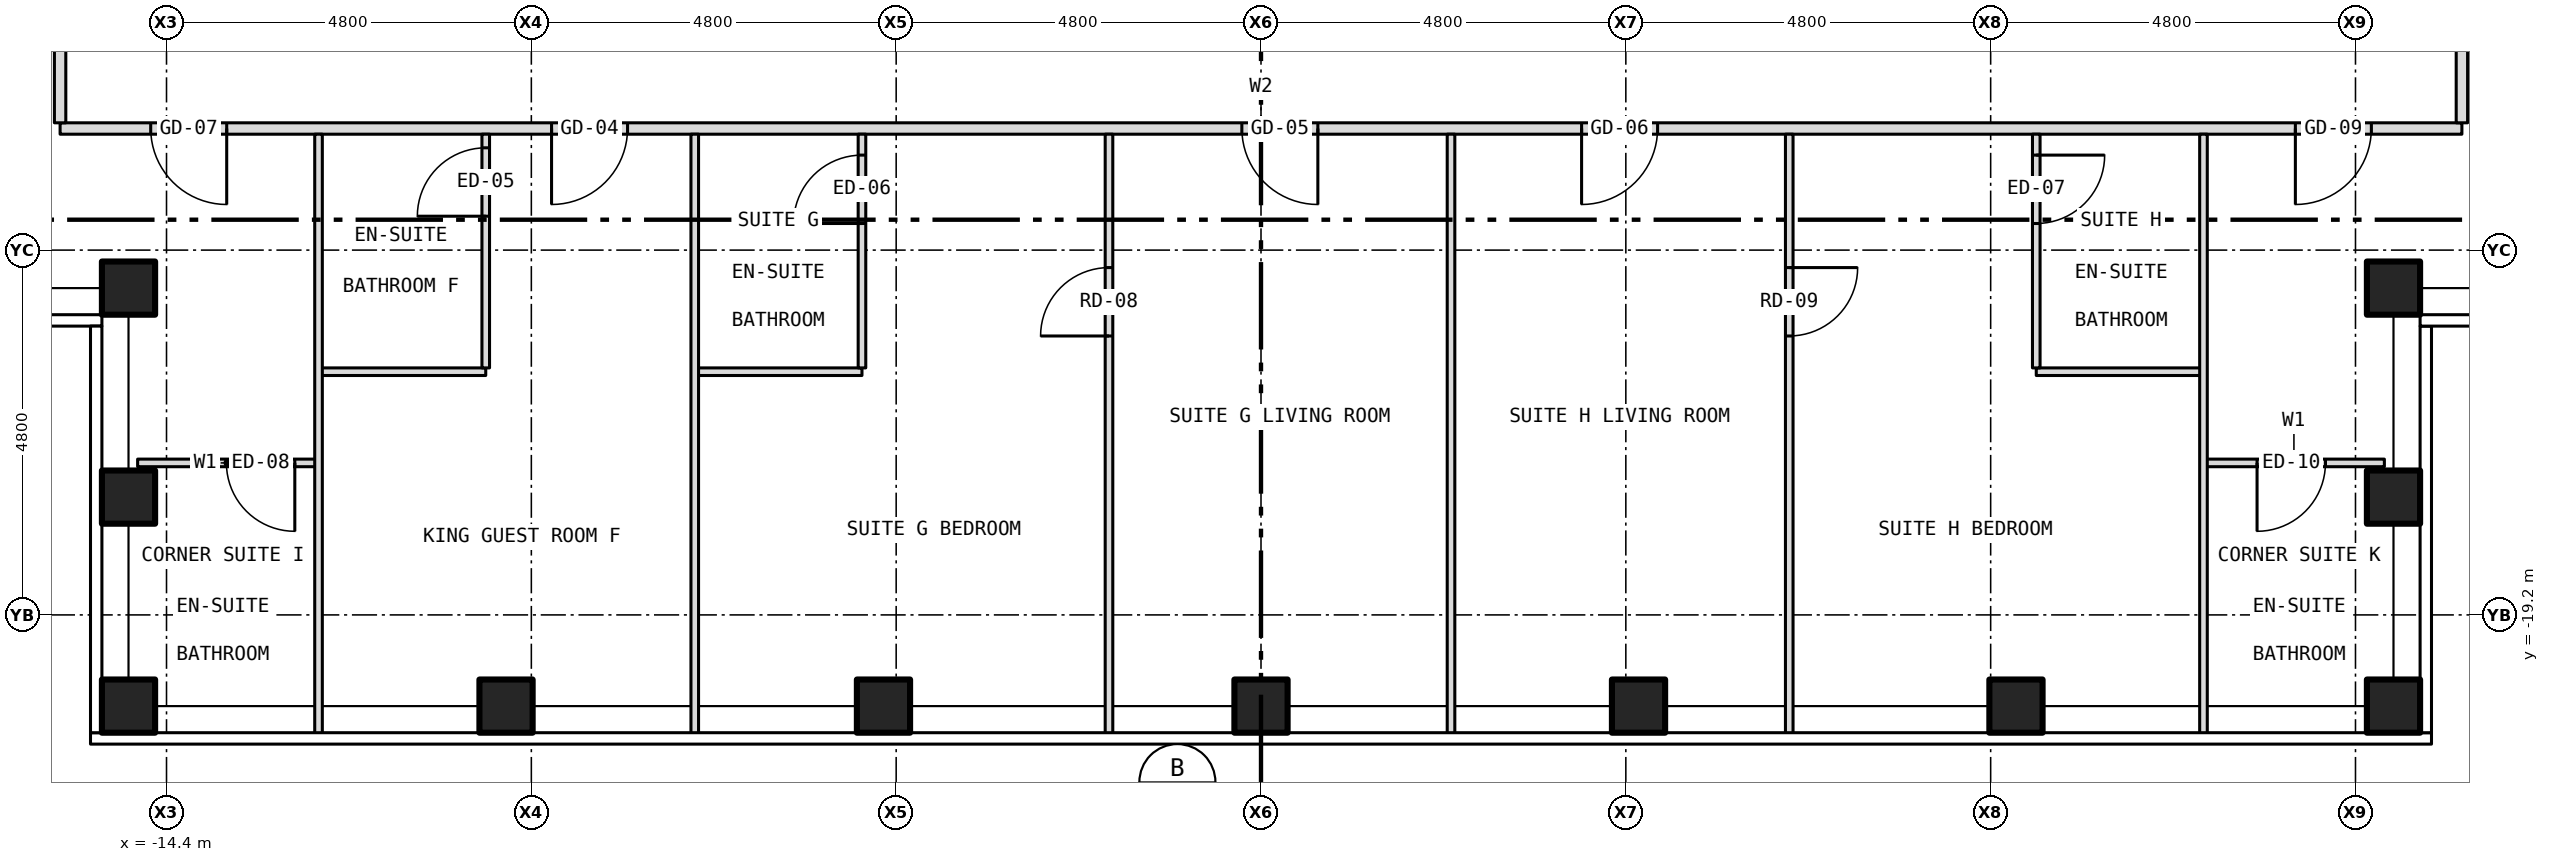
"""IFC4 building model, lengths in metres.
Left out: names, types, materials, properties, quantities, classifications, styles, units other than length and angle.
Written with IfcOpenShell. Run it as: python <this file> out.ifc"""

import sys

from ifc_helpers import new_model, si_unit, direction, frame, frame_2d, origin, origin_2d, place, context, subcontext, project, spatial, rectangle, hollow_rectangle, extrude, element, fill, save


model = new_model("IFC4")
c1 = context("Model", 3, precision=1e-05, world=origin(), true_north=direction((0.0, 1.0)))
c2 = subcontext(c1, "Body", "Model", "MODEL_VIEW")
j1 = project(units=[si_unit("LENGTHUNIT", "METRE"), si_unit("PLANEANGLEUNIT", "RADIAN")], contexts=[c1])
p1 = place(None, origin())
s1 = spatial("IfcSite", under=j1, at=p1, CompositionType="ELEMENT")
p2 = place(p1, origin())
s2 = spatial("IfcBuilding", under=s1, at=p2, CompositionType="ELEMENT")
p3 = place(p2, frame((0.0, 0.0, 208.5)))
s3 = spatial("IfcBuildingStorey", under=s2, at=p3, CompositionType="ELEMENT", Elevation=208.5)
for number, where, z_axis, x_axis in (
    (1, (-14.9, -20.4, -0.15), (0.0, 0.0, 1.0), (1.0, 0.0, 0.0)),
    (2, (-9.933, -20.4, -0.15), (0.0, 0.0, 1.0), (1.0, 0.0, 0.0)),
    (3, (-4.967, -20.4, -0.15), (0.0, 0.0, 1.0), (1.0, 0.0, 0.0)),
    (4, (0.0, -20.4, -0.15), (0.0, 0.0, 1.0), (1.0, 0.0, 0.0)),
    (5, (4.967, -20.4, -0.15), (0.0, 0.0, 1.0), (1.0, 0.0, 0.0)),
    (6, (9.933, -20.4, -0.15), (0.0, 0.0, 1.0), (1.0, 0.0, 0.0)),
    (7, (14.9, -20.4, -0.15), (0.0, 0.0, 1.0), (1.0, 0.0, 0.0)),
    (8, (-14.9, -14.9, -0.15), (0.0, 0.0, 1.0), (1.0, 0.0, 0.0)),
    (9, (-14.9, -17.65, -0.15), (0.0, 0.0, 1.0), (1.0, 0.0, 0.0)),
    (10, (14.9, -14.9, -0.15), (0.0, 0.0, 1.0), (1.0, 0.0, 0.0)),
    (11, (14.9, -17.65, -0.15), (0.0, 0.0, 1.0), (1.0, 0.0, 0.0)),
):
    element("IfcColumn", number, at=place(p3, frame(where, z_axis=z_axis, x_axis=x_axis)), inside=s3, PredefinedType="COLUMN", context=c2, shape_type="SweptSolid", body=[
        extrude(hollow_rectangle(XDim=0.7, YDim=0.7, WallThickness=0.04, at=origin_2d()), origin(), (0.0, 0.0, 1.0), 3.5),
    ])
p4 = place(p3, frame((-14.78, -17.2, 0.0), z_axis=(0.0, 0.0, 1.0), x_axis=(1.0, 0.0, 0.0)))
e12 = element("IfcWall", 12, at=p4, inside=s3, PredefinedType="PARTITIONING", context=c2, shape_type="SweptSolid", body=[
    extrude(rectangle(XDim=2.38, YDim=0.1, at=frame_2d((1.19, 0.0))), origin(), (0.0, 0.0, 1.0), 3.35),
])
p5 = place(p4, frame((1.168, 0.0, 0.0)))
e13 = element("IfcOpeningElement", 13, at=p5, cuts=e12, PredefinedType="OPENING", context=c2, shape_type="SweptSolid", body=[
    extrude(rectangle(XDim=0.9, YDim=2.1, at=frame_2d((0.45, 1.05))), frame((0.0, 0.062, 0.0), z_axis=(0.0, -1.0, 0.0), x_axis=(1.0, 0.0, 0.0)), (0.0, 0.0, 1.0), 0.124),
])
p6 = place(p3, frame((12.4, -17.2, 0.0), z_axis=(0.0, 0.0, 1.0), x_axis=(1.0, 0.0, 0.0)))
e14 = element("IfcWall", 14, at=p6, inside=s3, PredefinedType="PARTITIONING", context=c2, shape_type="SweptSolid", body=[
    extrude(rectangle(XDim=2.38, YDim=0.1, at=frame_2d((1.19, 0.0))), origin(), (0.0, 0.0, 1.0), 3.35),
])
p7 = place(p6, frame((0.705, 0.0, 0.0)))
e15 = element("IfcOpeningElement", 15, at=p7, cuts=e14, PredefinedType="OPENING", context=c2, shape_type="SweptSolid", body=[
    extrude(rectangle(XDim=0.9, YDim=2.1, at=frame_2d((0.45, 1.05))), frame((0.0, 0.062, 0.0), z_axis=(0.0, -1.0, 0.0), x_axis=(1.0, 0.0, 0.0)), (0.0, 0.0, 1.0), 0.124),
])
for number, where, z_axis, x_axis in (
    (16, (-12.4, -16.0, 0.0), (0.0, 0.0, 1.0), (1.0, 0.0, 0.0)),
    (17, (-7.45, -16.0, 0.0), (0.0, 0.0, 1.0), (1.0, 0.0, 0.0)),
    (18, (10.2, -16.0, 0.0), (0.0, 0.0, 1.0), (1.0, 0.0, 0.0)),
):
    element("IfcWall", number, at=place(p3, frame(where, z_axis=z_axis, x_axis=x_axis)), inside=s3, PredefinedType="PARTITIONING", context=c2, shape_type="SweptSolid", body=[
        extrude(rectangle(XDim=2.2, YDim=0.1, at=frame_2d((1.1, 0.0))), origin(), (0.0, 0.0, 1.0), 3.35),
    ])
p8 = place(p3, frame((-15.8, -12.8, 0.0), z_axis=(0.0, 0.0, 1.0), x_axis=(1.0, 0.0, 0.0)))
e19 = element("IfcWall", 19, at=p8, inside=s3, PredefinedType="PARTITIONING", context=c2, shape_type="SweptSolid", body=[
    extrude(rectangle(XDim=31.6, YDim=0.15, at=frame_2d((15.8, 0.0))), origin(), (0.0, 0.0, 1.0), 3.35),
])
p9 = place(p8, frame((6.466, 0.0, 0.0)))
e20 = element("IfcOpeningElement", 20, at=p9, cuts=e19, PredefinedType="OPENING", context=c2, shape_type="SweptSolid", body=[
    extrude(rectangle(XDim=1.0, YDim=2.1, at=frame_2d((0.5, 1.05))), frame((0.0, 0.087, 0.0), z_axis=(0.0, -1.0, 0.0), x_axis=(1.0, 0.0, 0.0)), (0.0, 0.0, 1.0), 0.174),
])
p10 = place(p8, frame((15.548, 0.0, 0.0)))
e21 = element("IfcOpeningElement", 21, at=p10, cuts=e19, PredefinedType="OPENING", context=c2, shape_type="SweptSolid", body=[
    extrude(rectangle(XDim=1.0, YDim=2.1, at=frame_2d((0.5, 1.05))), frame((0.0, 0.087, 0.0), z_axis=(0.0, -1.0, 0.0), x_axis=(1.0, 0.0, 0.0)), (0.0, 0.0, 1.0), 0.174),
])
p11 = place(p8, frame((20.018, 0.0, 0.0)))
e22 = element("IfcOpeningElement", 22, at=p11, cuts=e19, PredefinedType="OPENING", context=c2, shape_type="SweptSolid", body=[
    extrude(rectangle(XDim=1.0, YDim=2.1, at=frame_2d((0.5, 1.05))), frame((0.0, 0.087, 0.0), z_axis=(0.0, -1.0, 0.0), x_axis=(1.0, 0.0, 0.0)), (0.0, 0.0, 1.0), 0.174),
])
p12 = place(p8, frame((1.192, 0.0, 0.0)))
e23 = element("IfcOpeningElement", 23, at=p12, cuts=e19, PredefinedType="OPENING", context=c2, shape_type="SweptSolid", body=[
    extrude(rectangle(XDim=1.0, YDim=2.1, at=frame_2d((0.5, 1.05))), frame((0.0, 0.087, 0.0), z_axis=(0.0, -1.0, 0.0), x_axis=(1.0, 0.0, 0.0)), (0.0, 0.0, 1.0), 0.174),
])
p13 = place(p8, frame((29.409, 0.0, 0.0)))
e24 = element("IfcOpeningElement", 24, at=p13, cuts=e19, PredefinedType="OPENING", context=c2, shape_type="SweptSolid", body=[
    extrude(rectangle(XDim=1.0, YDim=2.1, at=frame_2d((0.5, 1.05))), frame((0.0, 0.087, 0.0), z_axis=(0.0, -1.0, 0.0), x_axis=(1.0, 0.0, 0.0)), (0.0, 0.0, 1.0), 0.174),
])
p14 = place(p3, frame((-15.8, -12.725, 0.0), z_axis=(0.0, 0.0, 1.0), x_axis=(0.0, 1.0, 0.0)))
e25 = element("IfcWall", 25, at=p14, inside=s3, PredefinedType="PARTITIONING", context=c2, shape_type="SweptSolid", body=[
    extrude(rectangle(XDim=1.805, YDim=0.15, at=frame_2d((0.903, 0.0))), origin(), (0.0, 0.0, 1.0), 3.35),
])
p15 = place(p3, frame((-12.4, -20.78, 0.0), z_axis=(0.0, 0.0, 1.0), x_axis=(0.0, 1.0, 0.0)))
e26 = element("IfcWall", 26, at=p15, inside=s3, PredefinedType="PARTITIONING", context=c2, shape_type="SweptSolid", body=[
    extrude(rectangle(XDim=7.905, YDim=0.1, at=frame_2d((3.953, 0.0))), origin(), (0.0, 0.0, 1.0), 3.35),
])
p16 = place(p3, frame((-10.2, -15.95, 0.0), z_axis=(0.0, 0.0, 1.0), x_axis=(0.0, 1.0, 0.0)))
e27 = element("IfcWall", 27, at=p16, inside=s3, PredefinedType="PARTITIONING", context=c2, shape_type="SweptSolid", body=[
    extrude(rectangle(XDim=3.075, YDim=0.1, at=frame_2d((1.538, 0.0))), origin(), (0.0, 0.0, 1.0), 3.35),
])
p17 = place(p16, frame((1.996, 0.0, 0.0)))
e28 = element("IfcOpeningElement", 28, at=p17, cuts=e27, PredefinedType="OPENING", context=c2, shape_type="SweptSolid", body=[
    extrude(rectangle(XDim=0.9, YDim=2.1, at=frame_2d((0.45, 1.05))), frame((0.0, 0.062, 0.0), z_axis=(0.0, -1.0, 0.0), x_axis=(1.0, 0.0, 0.0)), (0.0, 0.0, 1.0), 0.124),
])
p18 = place(p3, frame((-7.45, -20.78, 0.0), z_axis=(0.0, 0.0, 1.0), x_axis=(0.0, 1.0, 0.0)))
e29 = element("IfcWall", 29, at=p18, inside=s3, PredefinedType="PARTITIONING", context=c2, shape_type="SweptSolid", body=[
    extrude(rectangle(XDim=7.905, YDim=0.1, at=frame_2d((3.953, 0.0))), origin(), (0.0, 0.0, 1.0), 3.35),
])
p19 = place(p3, frame((-5.25, -15.95, 0.0), z_axis=(0.0, 0.0, 1.0), x_axis=(0.0, 1.0, 0.0)))
e30 = element("IfcWall", 30, at=p19, inside=s3, PredefinedType="PARTITIONING", context=c2, shape_type="SweptSolid", body=[
    extrude(rectangle(XDim=3.075, YDim=0.1, at=frame_2d((1.538, 0.0))), origin(), (0.0, 0.0, 1.0), 3.35),
])
p20 = place(p19, frame((1.9, 0.0, 0.0)))
e31 = element("IfcOpeningElement", 31, at=p20, cuts=e30, PredefinedType="OPENING", context=c2, shape_type="SweptSolid", body=[
    extrude(rectangle(XDim=0.9, YDim=2.1, at=frame_2d((0.45, 1.05))), frame((0.0, 0.062, 0.0), z_axis=(0.0, -1.0, 0.0), x_axis=(1.0, 0.0, 0.0)), (0.0, 0.0, 1.0), 0.124),
])
p21 = place(p3, frame((-2.0, -20.78, 0.0), z_axis=(0.0, 0.0, 1.0), x_axis=(0.0, 1.0, 0.0)))
e32 = element("IfcWall", 32, at=p21, inside=s3, PredefinedType="PARTITIONING", context=c2, shape_type="SweptSolid", body=[
    extrude(rectangle(XDim=7.905, YDim=0.1, at=frame_2d((3.953, 0.0))), origin(), (0.0, 0.0, 1.0), 3.35),
])
p22 = place(p21, frame((5.25, 0.0, 0.0)))
e33 = element("IfcOpeningElement", 33, at=p22, cuts=e32, PredefinedType="OPENING", context=c2, shape_type="SweptSolid", body=[
    extrude(rectangle(XDim=0.9, YDim=2.1, at=frame_2d((0.45, 1.05))), frame((0.0, 0.062, 0.0), z_axis=(0.0, -1.0, 0.0), x_axis=(1.0, 0.0, 0.0)), (0.0, 0.0, 1.0), 0.124),
])
p23 = place(p3, frame((2.5, -20.78, 0.0), z_axis=(0.0, 0.0, 1.0), x_axis=(0.0, 1.0, 0.0)))
e34 = element("IfcWall", 34, at=p23, inside=s3, PredefinedType="PARTITIONING", context=c2, shape_type="SweptSolid", body=[
    extrude(rectangle(XDim=7.905, YDim=0.1, at=frame_2d((3.953, 0.0))), origin(), (0.0, 0.0, 1.0), 3.35),
])
p24 = place(p3, frame((6.95, -20.78, 0.0), z_axis=(0.0, 0.0, 1.0), x_axis=(0.0, 1.0, 0.0)))
e35 = element("IfcWall", 35, at=p24, inside=s3, PredefinedType="PARTITIONING", context=c2, shape_type="SweptSolid", body=[
    extrude(rectangle(XDim=7.905, YDim=0.1, at=frame_2d((3.953, 0.0))), origin(), (0.0, 0.0, 1.0), 3.35),
])
p25 = place(p24, frame((5.25, 0.0, 0.0)))
e36 = element("IfcOpeningElement", 36, at=p25, cuts=e35, PredefinedType="OPENING", context=c2, shape_type="SweptSolid", body=[
    extrude(rectangle(XDim=0.9, YDim=2.1, at=frame_2d((0.45, 1.05))), frame((0.0, 0.062, 0.0), z_axis=(0.0, -1.0, 0.0), x_axis=(1.0, 0.0, 0.0)), (0.0, 0.0, 1.0), 0.124),
])
p26 = place(p3, frame((10.2, -15.95, 0.0), z_axis=(0.0, 0.0, 1.0), x_axis=(0.0, 1.0, 0.0)))
e37 = element("IfcWall", 37, at=p26, inside=s3, PredefinedType="PARTITIONING", context=c2, shape_type="SweptSolid", body=[
    extrude(rectangle(XDim=3.075, YDim=0.1, at=frame_2d((1.538, 0.0))), origin(), (0.0, 0.0, 1.0), 3.35),
])
p27 = place(p26, frame((1.9, 0.0, 0.0)))
e38 = element("IfcOpeningElement", 38, at=p27, cuts=e37, PredefinedType="OPENING", context=c2, shape_type="SweptSolid", body=[
    extrude(rectangle(XDim=0.9, YDim=2.1, at=frame_2d((0.45, 1.05))), frame((0.0, 0.062, 0.0), z_axis=(0.0, -1.0, 0.0), x_axis=(1.0, 0.0, 0.0)), (0.0, 0.0, 1.0), 0.124),
])
p28 = place(p3, frame((12.4, -20.78, 0.0), z_axis=(0.0, 0.0, 1.0), x_axis=(0.0, 1.0, 0.0)))
e39 = element("IfcWall", 39, at=p28, inside=s3, PredefinedType="PARTITIONING", context=c2, shape_type="SweptSolid", body=[
    extrude(rectangle(XDim=7.905, YDim=0.1, at=frame_2d((3.953, 0.0))), origin(), (0.0, 0.0, 1.0), 3.35),
])
p29 = place(p3, frame((15.8, -12.725, 0.0), z_axis=(0.0, 0.0, 1.0), x_axis=(0.0, 1.0, 0.0)))
e40 = element("IfcWall", 40, at=p29, inside=s3, PredefinedType="PARTITIONING", context=c2, shape_type="SweptSolid", body=[
    extrude(rectangle(XDim=1.805, YDim=0.15, at=frame_2d((0.903, 0.0))), origin(), (0.0, 0.0, 1.0), 3.35),
])
p30 = place(p9, origin())
e41 = element("IfcDoor", 41, at=p30, inside=s3, OperationType="SINGLE_SWING_LEFT", PredefinedType="DOOR", context=c2, shape_type="SweptSolid", body=[
    extrude(rectangle(XDim=1.0, YDim=2.1, at=frame_2d((0.5, 1.05))), frame((0.0, 0.025, 0.0), z_axis=(0.0, -1.0, 0.0), x_axis=(1.0, 0.0, 0.0)), (0.0, 0.0, 1.0), 0.05),
])
fill(e20, e41)
p31 = place(p17, origin())
e42 = element("IfcDoor", 42, at=p31, inside=s3, OperationType="SINGLE_SWING_LEFT", PredefinedType="DOOR", context=c2, shape_type="SweptSolid", body=[
    extrude(rectangle(XDim=0.9, YDim=2.1, at=frame_2d((0.45, 1.05))), frame((0.0, 0.025, 0.0), z_axis=(0.0, -1.0, 0.0), x_axis=(1.0, 0.0, 0.0)), (0.0, 0.0, 1.0), 0.05),
])
fill(e28, e42)
p32 = place(p10, origin())
e43 = element("IfcDoor", 43, at=p32, inside=s3, OperationType="SINGLE_SWING_RIGHT", PredefinedType="DOOR", context=c2, shape_type="SweptSolid", body=[
    extrude(rectangle(XDim=1.0, YDim=2.1, at=frame_2d((0.5, 1.05))), frame((0.0, 0.025, 0.0), z_axis=(0.0, -1.0, 0.0), x_axis=(1.0, 0.0, 0.0)), (0.0, 0.0, 1.0), 0.05),
])
fill(e21, e43)
p33 = place(p22, origin())
e44 = element("IfcDoor", 44, at=p33, inside=s3, OperationType="SINGLE_SWING_LEFT", PredefinedType="DOOR", context=c2, shape_type="SweptSolid", body=[
    extrude(rectangle(XDim=0.9, YDim=2.1, at=frame_2d((0.45, 1.05))), frame((0.0, 0.025, 0.0), z_axis=(0.0, -1.0, 0.0), x_axis=(1.0, 0.0, 0.0)), (0.0, 0.0, 1.0), 0.05),
])
fill(e33, e44)
p34 = place(p20, origin())
e45 = element("IfcDoor", 45, at=p34, inside=s3, OperationType="SINGLE_SWING_LEFT", PredefinedType="DOOR", context=c2, shape_type="SweptSolid", body=[
    extrude(rectangle(XDim=0.9, YDim=2.1, at=frame_2d((0.45, 1.05))), frame((0.0, 0.025, 0.0), z_axis=(0.0, -1.0, 0.0), x_axis=(1.0, 0.0, 0.0)), (0.0, 0.0, 1.0), 0.05),
])
fill(e31, e45)
p35 = place(p11, origin())
e46 = element("IfcDoor", 46, at=p35, inside=s3, OperationType="SINGLE_SWING_LEFT", PredefinedType="DOOR", context=c2, shape_type="SweptSolid", body=[
    extrude(rectangle(XDim=1.0, YDim=2.1, at=frame_2d((0.5, 1.05))), frame((0.0, 0.025, 0.0), z_axis=(0.0, -1.0, 0.0), x_axis=(1.0, 0.0, 0.0)), (0.0, 0.0, 1.0), 0.05),
])
fill(e22, e46)
p36 = place(p25, origin())
e47 = element("IfcDoor", 47, at=p36, inside=s3, OperationType="SINGLE_SWING_RIGHT", PredefinedType="DOOR", context=c2, shape_type="SweptSolid", body=[
    extrude(rectangle(XDim=0.9, YDim=2.1, at=frame_2d((0.45, 1.05))), frame((0.0, 0.025, 0.0), z_axis=(0.0, -1.0, 0.0), x_axis=(1.0, 0.0, 0.0)), (0.0, 0.0, 1.0), 0.05),
])
fill(e36, e47)
p37 = place(p27, origin())
e48 = element("IfcDoor", 48, at=p37, inside=s3, OperationType="SINGLE_SWING_RIGHT", PredefinedType="DOOR", context=c2, shape_type="SweptSolid", body=[
    extrude(rectangle(XDim=0.9, YDim=2.1, at=frame_2d((0.45, 1.05))), frame((0.0, 0.025, 0.0), z_axis=(0.0, -1.0, 0.0), x_axis=(1.0, 0.0, 0.0)), (0.0, 0.0, 1.0), 0.05),
])
fill(e38, e48)
p38 = place(p5, origin())
e49 = element("IfcDoor", 49, at=p38, inside=s3, OperationType="SINGLE_SWING_RIGHT", PredefinedType="DOOR", context=c2, shape_type="SweptSolid", body=[
    extrude(rectangle(XDim=0.9, YDim=2.1, at=frame_2d((0.45, 1.05))), frame((0.0, 0.025, 0.0), z_axis=(0.0, -1.0, 0.0), x_axis=(1.0, 0.0, 0.0)), (0.0, 0.0, 1.0), 0.05),
])
fill(e13, e49)
p39 = place(p12, origin())
e50 = element("IfcDoor", 50, at=p39, inside=s3, OperationType="SINGLE_SWING_RIGHT", PredefinedType="DOOR", context=c2, shape_type="SweptSolid", body=[
    extrude(rectangle(XDim=1.0, YDim=2.1, at=frame_2d((0.5, 1.05))), frame((0.0, 0.025, 0.0), z_axis=(0.0, -1.0, 0.0), x_axis=(1.0, 0.0, 0.0)), (0.0, 0.0, 1.0), 0.05),
])
fill(e23, e50)
p40 = place(p7, origin())
e51 = element("IfcDoor", 51, at=p40, inside=s3, OperationType="SINGLE_SWING_LEFT", PredefinedType="DOOR", context=c2, shape_type="SweptSolid", body=[
    extrude(rectangle(XDim=0.9, YDim=2.1, at=frame_2d((0.45, 1.05))), frame((0.0, 0.025, 0.0), z_axis=(0.0, -1.0, 0.0), x_axis=(1.0, 0.0, 0.0)), (0.0, 0.0, 1.0), 0.05),
])
fill(e15, e51)
p41 = place(p13, origin())
e52 = element("IfcDoor", 52, at=p41, inside=s3, OperationType="SINGLE_SWING_LEFT", PredefinedType="DOOR", context=c2, shape_type="SweptSolid", body=[
    extrude(rectangle(XDim=1.0, YDim=2.1, at=frame_2d((0.5, 1.05))), frame((0.0, 0.025, 0.0), z_axis=(0.0, -1.0, 0.0), x_axis=(1.0, 0.0, 0.0)), (0.0, 0.0, 1.0), 0.05),
])
fill(e24, e52)
save(model, sys.argv[1])
